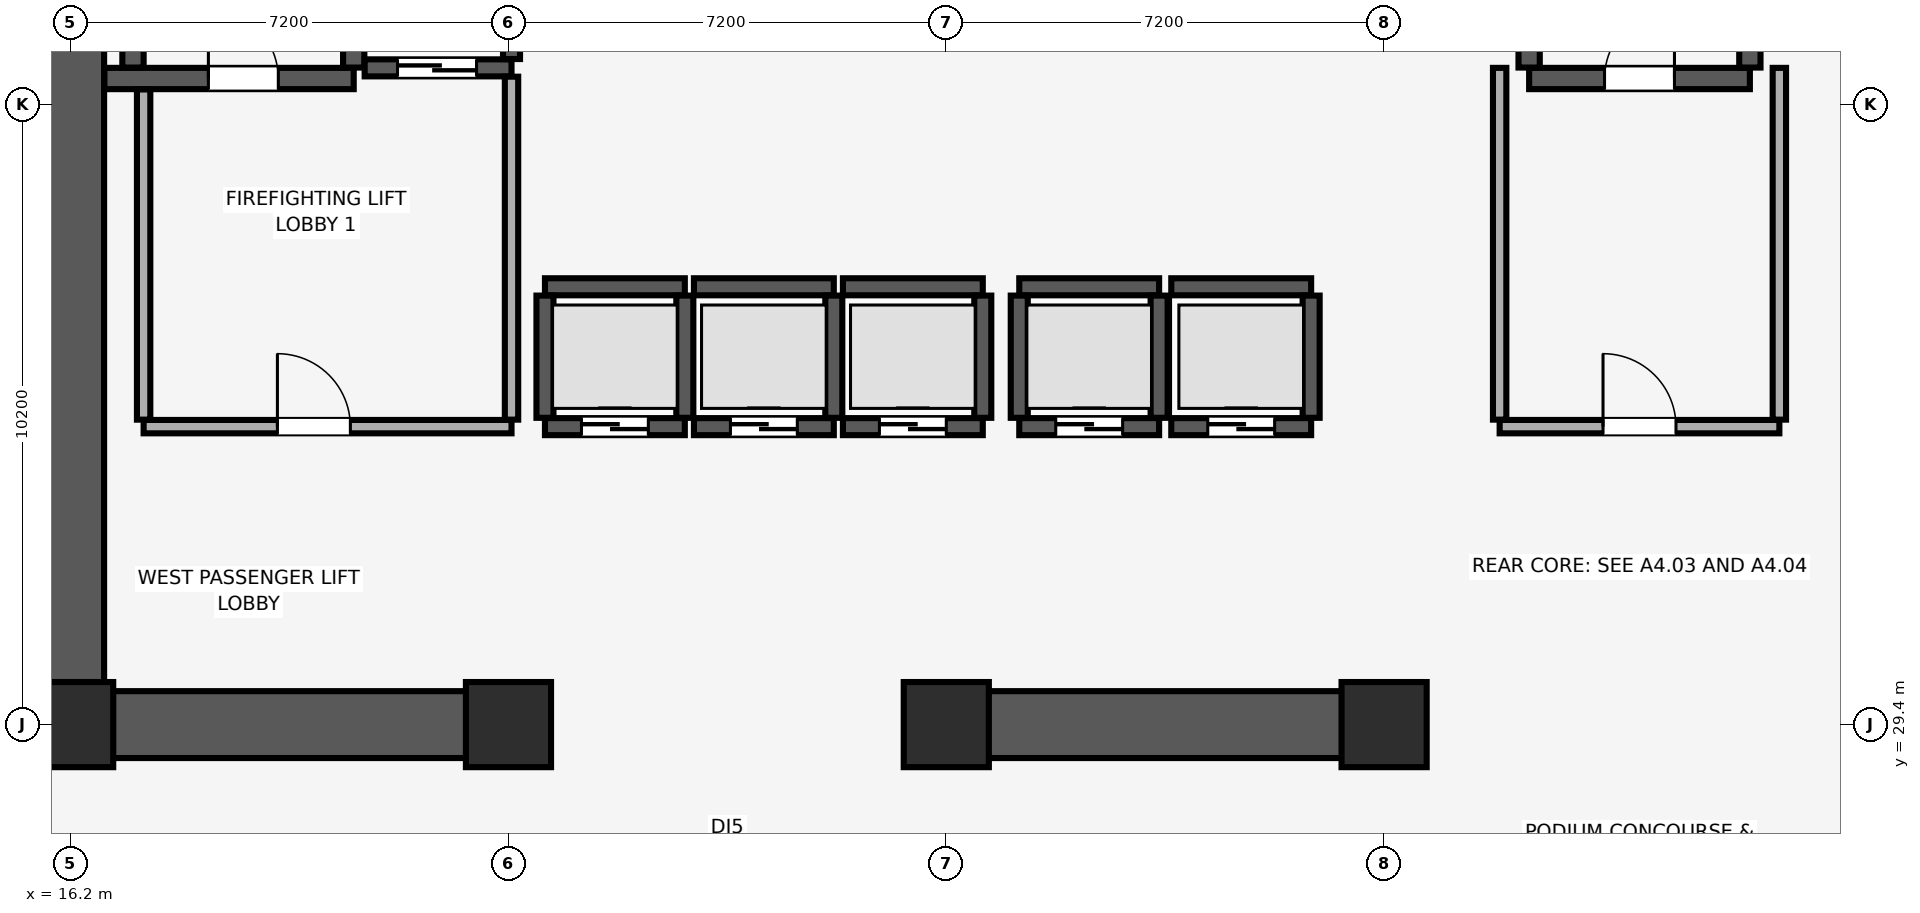
"""IFC4 building model, lengths in metres.
Left out: names, types, materials, properties, quantities, classifications, styles, units other than length and angle.
Written with IfcOpenShell. Run it as: python <this file> out.ifc"""

import sys

from ifc_helpers import new_model, si_unit, direction, frame, frame_2d, origin, origin_2d, place, context, subcontext, project, spatial, rectangle, extrude, element, fill, save


model = new_model("IFC4")
c1 = context("Model", 3, precision=1e-05, world=origin(), true_north=direction((0.0, 1.0)))
c2 = subcontext(c1, "Body", "Model", "MODEL_VIEW")
j1 = project(units=[si_unit("LENGTHUNIT", "METRE"), si_unit("PLANEANGLEUNIT", "RADIAN")], contexts=[c1])
p1 = place(None, origin())
s1 = spatial("IfcSite", under=j1, at=p1, CompositionType="ELEMENT")
p2 = place(p1, origin())
s2 = spatial("IfcBuilding", under=s1, at=p2, CompositionType="ELEMENT")
p3 = place(p2, frame((0.0, 0.0, 8.0)))
s3 = spatial("IfcBuildingStorey", under=s2, at=p3, CompositionType="ELEMENT", Elevation=8.0)
for number, where, z_axis, x_axis in (
    (1, (16.2, 29.4, 0.0), (0.0, 0.0, 1.0), (1.0, 0.0, 0.0)),
    (2, (23.4, 29.4, 0.0), (0.0, 0.0, 1.0), (1.0, 0.0, 0.0)),
    (3, (30.6, 29.4, 0.0), (0.0, 0.0, 1.0), (1.0, 0.0, 0.0)),
    (4, (37.8, 29.4, 0.0), (0.0, 0.0, 1.0), (1.0, 0.0, 0.0)),
):
    element("IfcColumn", number, at=place(p3, frame(where, z_axis=z_axis, x_axis=x_axis)), inside=s3, PredefinedType="COLUMN", context=c2, shape_type="SweptSolid", body=[
        extrude(rectangle(XDim=1.4, YDim=1.4, at=origin_2d()), origin(), (0.0, 0.0, 1.0), 5.68),
    ])
p4 = place(p3, frame((16.2, 29.4, 0.0), z_axis=(0.0, 0.0, 1.0), x_axis=(0.0, 1.0, 0.0)))
e5 = element("IfcWall", 5, at=p4, inside=s3, PredefinedType="SHEAR", context=c2, shape_type="SweptSolid", body=[
    extrude(rectangle(XDim=19.2, YDim=1.1, at=frame_2d((9.6, 0.0))), origin(), (0.0, 0.0, 1.0), 5.68),
])
p5 = place(p3, frame((16.755, 29.4, 0.0), z_axis=(0.0, 0.0, 1.0), x_axis=(1.0, 0.0, 0.0)))
e6 = element("IfcWall", 6, at=p5, inside=s3, PredefinedType="SHEAR", context=c2, shape_type="SweptSolid", body=[
    extrude(rectangle(XDim=6.845, YDim=1.1, at=frame_2d((3.423, 0.0))), origin(), (0.0, 0.0, 1.0), 5.68),
])
p6 = place(p3, frame((30.4, 29.4, 0.0), z_axis=(0.0, 0.0, 1.0), x_axis=(1.0, 0.0, 0.0)))
e7 = element("IfcWall", 7, at=p6, inside=s3, PredefinedType="SHEAR", context=c2, shape_type="SweptSolid", body=[
    extrude(rectangle(XDim=7.6, YDim=1.1, at=frame_2d((3.8, 0.0))), origin(), (0.0, 0.0, 1.0), 5.68),
])
p7 = place(p3, frame((16.755, 40.025, 0.0), z_axis=(0.0, 0.0, 1.0), x_axis=(1.0, 0.0, 0.0)))
e8 = element("IfcWall", 8, at=p7, inside=s3, PredefinedType="SHEAR", context=c2, shape_type="SweptSolid", body=[
    extrude(rectangle(XDim=4.1, YDim=0.35, at=frame_2d((2.05, 0.0))), origin(), (0.0, 0.0, 1.0), 5.68),
])
p8 = place(p7, frame((1.71, 0.0, 0.0)))
e9 = element("IfcOpeningElement", 9, at=p8, cuts=e8, PredefinedType="OPENING", context=c2, shape_type="SweptSolid", body=[
    extrude(rectangle(XDim=1.15, YDim=2.15, at=frame_2d((0.575, 1.075))), frame((0.0, 0.185, 0.0), z_axis=(0.0, -1.0, 0.0), x_axis=(1.0, 0.0, 0.0)), (0.0, 0.0, 1.0), 0.37),
])
for number, where, z_axis, x_axis in (
    (10, (17.225, 40.205, 0.0), (0.0, 0.0, 1.0), (0.0, 1.0, 0.0)),
    (11, (20.855, 40.205, 0.0), (0.0, 0.0, 1.0), (0.0, 1.0, 0.0)),
):
    element("IfcWall", number, at=place(p3, frame(where, z_axis=z_axis, x_axis=x_axis)), inside=s3, PredefinedType="SHEAR", context=c2, shape_type="SweptSolid", body=[
        extrude(rectangle(XDim=8.09, YDim=0.35, at=frame_2d((4.045, 0.0))), origin(), (0.0, 0.0, 1.0), 5.68),
    ])
p9 = place(p3, frame((40.185, 40.025, 0.0), z_axis=(0.0, 0.0, 1.0), x_axis=(1.0, 0.0, 0.0)))
e12 = element("IfcWall", 12, at=p9, inside=s3, PredefinedType="SHEAR", context=c2, shape_type="SweptSolid", body=[
    extrude(rectangle(XDim=3.63, YDim=0.35, at=frame_2d((1.815, 0.0))), origin(), (0.0, 0.0, 1.0), 5.68),
])
p10 = place(p9, frame((1.24, 0.0, 0.0)))
e13 = element("IfcOpeningElement", 13, at=p10, cuts=e12, PredefinedType="OPENING", context=c2, shape_type="SweptSolid", body=[
    extrude(rectangle(XDim=1.15, YDim=2.15, at=frame_2d((0.575, 1.075))), frame((0.0, 0.185, 0.0), z_axis=(0.0, -1.0, 0.0), x_axis=(1.0, 0.0, 0.0)), (0.0, 0.0, 1.0), 0.37),
])
for number, where, z_axis, x_axis in (
    (14, (40.185, 40.205, 0.0), (0.0, 0.0, 1.0), (0.0, 1.0, 0.0)),
    (15, (43.815, 40.205, 0.0), (0.0, 0.0, 1.0), (0.0, 1.0, 0.0)),
):
    element("IfcWall", number, at=place(p3, frame(where, z_axis=z_axis, x_axis=x_axis)), inside=s3, PredefinedType="SHEAR", context=c2, shape_type="SweptSolid", body=[
        extrude(rectangle(XDim=8.09, YDim=0.35, at=frame_2d((4.045, 0.0))), origin(), (0.0, 0.0, 1.0), 5.68),
    ])
p11 = place(p3, frame((24.0, 34.3, 0.0), z_axis=(0.0, 0.0, 1.0), x_axis=(1.0, 0.0, 0.0)))
e16 = element("IfcWall", 16, at=p11, inside=s3, PredefinedType="SHEAR", context=c2, shape_type="SweptSolid", body=[
    extrude(rectangle(XDim=2.3, YDim=0.28, at=frame_2d((1.15, 0.0))), origin(), (0.0, 0.0, 1.0), 5.68),
])
p12 = place(p11, frame((0.6, 0.0, 0.0)))
e17 = element("IfcOpeningElement", 17, at=p12, cuts=e16, PredefinedType="OPENING", context=c2, shape_type="SweptSolid", body=[
    extrude(rectangle(XDim=1.1, YDim=2.2, at=frame_2d((0.55, 1.1))), frame((0.0, 0.15, 0.0), z_axis=(0.0, -1.0, 0.0), x_axis=(1.0, 0.0, 0.0)), (0.0, 0.0, 1.0), 0.3),
])
p13 = place(p3, frame((24.0, 36.6, 0.0), z_axis=(0.0, 0.0, 1.0), x_axis=(1.0, 0.0, 0.0)))
e18 = element("IfcWall", 18, at=p13, inside=s3, PredefinedType="SHEAR", context=c2, shape_type="SweptSolid", body=[
    extrude(rectangle(XDim=2.3, YDim=0.28, at=frame_2d((1.15, 0.0))), origin(), (0.0, 0.0, 1.0), 5.68),
])
for number, where, z_axis, x_axis in (
    (19, (24.0, 34.445, 0.0), (0.0, 0.0, 1.0), (0.0, 1.0, 0.0)),
    (20, (26.3, 34.445, 0.0), (0.0, 0.0, 1.0), (0.0, 1.0, 0.0)),
):
    element("IfcWall", number, at=place(p3, frame(where, z_axis=z_axis, x_axis=x_axis)), inside=s3, PredefinedType="SHEAR", context=c2, shape_type="SweptSolid", body=[
        extrude(rectangle(XDim=2.01, YDim=0.28, at=frame_2d((1.005, 0.0))), origin(), (0.0, 0.0, 1.0), 5.68),
    ])
p14 = place(p3, frame((26.45, 34.3, 0.0), z_axis=(0.0, 0.0, 1.0), x_axis=(1.0, 0.0, 0.0)))
e21 = element("IfcWall", 21, at=p14, inside=s3, PredefinedType="SHEAR", context=c2, shape_type="SweptSolid", body=[
    extrude(rectangle(XDim=2.3, YDim=0.28, at=frame_2d((1.15, 0.0))), origin(), (0.0, 0.0, 1.0), 5.68),
])
p15 = place(p14, frame((0.6, 0.0, 0.0)))
e22 = element("IfcOpeningElement", 22, at=p15, cuts=e21, PredefinedType="OPENING", context=c2, shape_type="SweptSolid", body=[
    extrude(rectangle(XDim=1.1, YDim=2.2, at=frame_2d((0.55, 1.1))), frame((0.0, 0.15, 0.0), z_axis=(0.0, -1.0, 0.0), x_axis=(1.0, 0.0, 0.0)), (0.0, 0.0, 1.0), 0.3),
])
p16 = place(p3, frame((26.45, 36.6, 0.0), z_axis=(0.0, 0.0, 1.0), x_axis=(1.0, 0.0, 0.0)))
e23 = element("IfcWall", 23, at=p16, inside=s3, PredefinedType="SHEAR", context=c2, shape_type="SweptSolid", body=[
    extrude(rectangle(XDim=2.3, YDim=0.28, at=frame_2d((1.15, 0.0))), origin(), (0.0, 0.0, 1.0), 5.68),
])
p17 = place(p3, frame((28.75, 34.445, 0.0), z_axis=(0.0, 0.0, 1.0), x_axis=(0.0, 1.0, 0.0)))
e24 = element("IfcWall", 24, at=p17, inside=s3, PredefinedType="SHEAR", context=c2, shape_type="SweptSolid", body=[
    extrude(rectangle(XDim=2.01, YDim=0.28, at=frame_2d((1.005, 0.0))), origin(), (0.0, 0.0, 1.0), 5.68),
])
p18 = place(p3, frame((28.9, 34.3, 0.0), z_axis=(0.0, 0.0, 1.0), x_axis=(1.0, 0.0, 0.0)))
e25 = element("IfcWall", 25, at=p18, inside=s3, PredefinedType="SHEAR", context=c2, shape_type="SweptSolid", body=[
    extrude(rectangle(XDim=2.3, YDim=0.28, at=frame_2d((1.15, 0.0))), origin(), (0.0, 0.0, 1.0), 5.68),
])
p19 = place(p18, frame((0.6, 0.0, 0.0)))
e26 = element("IfcOpeningElement", 26, at=p19, cuts=e25, PredefinedType="OPENING", context=c2, shape_type="SweptSolid", body=[
    extrude(rectangle(XDim=1.1, YDim=2.2, at=frame_2d((0.55, 1.1))), frame((0.0, 0.15, 0.0), z_axis=(0.0, -1.0, 0.0), x_axis=(1.0, 0.0, 0.0)), (0.0, 0.0, 1.0), 0.3),
])
p20 = place(p3, frame((28.9, 36.6, 0.0), z_axis=(0.0, 0.0, 1.0), x_axis=(1.0, 0.0, 0.0)))
e27 = element("IfcWall", 27, at=p20, inside=s3, PredefinedType="SHEAR", context=c2, shape_type="SweptSolid", body=[
    extrude(rectangle(XDim=2.3, YDim=0.28, at=frame_2d((1.15, 0.0))), origin(), (0.0, 0.0, 1.0), 5.68),
])
p21 = place(p3, frame((31.2, 34.445, 0.0), z_axis=(0.0, 0.0, 1.0), x_axis=(0.0, 1.0, 0.0)))
e28 = element("IfcWall", 28, at=p21, inside=s3, PredefinedType="SHEAR", context=c2, shape_type="SweptSolid", body=[
    extrude(rectangle(XDim=2.01, YDim=0.28, at=frame_2d((1.005, 0.0))), origin(), (0.0, 0.0, 1.0), 5.68),
])
p22 = place(p3, frame((31.8, 34.3, 0.0), z_axis=(0.0, 0.0, 1.0), x_axis=(1.0, 0.0, 0.0)))
e29 = element("IfcWall", 29, at=p22, inside=s3, PredefinedType="SHEAR", context=c2, shape_type="SweptSolid", body=[
    extrude(rectangle(XDim=2.3, YDim=0.28, at=frame_2d((1.15, 0.0))), origin(), (0.0, 0.0, 1.0), 5.68),
])
p23 = place(p22, frame((0.6, 0.0, 0.0)))
e30 = element("IfcOpeningElement", 30, at=p23, cuts=e29, PredefinedType="OPENING", context=c2, shape_type="SweptSolid", body=[
    extrude(rectangle(XDim=1.1, YDim=2.2, at=frame_2d((0.55, 1.1))), frame((0.0, 0.15, 0.0), z_axis=(0.0, -1.0, 0.0), x_axis=(1.0, 0.0, 0.0)), (0.0, 0.0, 1.0), 0.3),
])
p24 = place(p3, frame((31.8, 36.6, 0.0), z_axis=(0.0, 0.0, 1.0), x_axis=(1.0, 0.0, 0.0)))
e31 = element("IfcWall", 31, at=p24, inside=s3, PredefinedType="SHEAR", context=c2, shape_type="SweptSolid", body=[
    extrude(rectangle(XDim=2.3, YDim=0.28, at=frame_2d((1.15, 0.0))), origin(), (0.0, 0.0, 1.0), 5.68),
])
for number, where, z_axis, x_axis in (
    (32, (31.8, 34.445, 0.0), (0.0, 0.0, 1.0), (0.0, 1.0, 0.0)),
    (33, (34.1, 34.445, 0.0), (0.0, 0.0, 1.0), (0.0, 1.0, 0.0)),
):
    element("IfcWall", number, at=place(p3, frame(where, z_axis=z_axis, x_axis=x_axis)), inside=s3, PredefinedType="SHEAR", context=c2, shape_type="SweptSolid", body=[
        extrude(rectangle(XDim=2.01, YDim=0.28, at=frame_2d((1.005, 0.0))), origin(), (0.0, 0.0, 1.0), 5.68),
    ])
p25 = place(p3, frame((34.3, 34.3, 0.0), z_axis=(0.0, 0.0, 1.0), x_axis=(1.0, 0.0, 0.0)))
e34 = element("IfcWall", 34, at=p25, inside=s3, PredefinedType="SHEAR", context=c2, shape_type="SweptSolid", body=[
    extrude(rectangle(XDim=2.3, YDim=0.28, at=frame_2d((1.15, 0.0))), origin(), (0.0, 0.0, 1.0), 5.68),
])
p26 = place(p25, frame((0.6, 0.0, 0.0)))
e35 = element("IfcOpeningElement", 35, at=p26, cuts=e34, PredefinedType="OPENING", context=c2, shape_type="SweptSolid", body=[
    extrude(rectangle(XDim=1.1, YDim=2.2, at=frame_2d((0.55, 1.1))), frame((0.0, 0.15, 0.0), z_axis=(0.0, -1.0, 0.0), x_axis=(1.0, 0.0, 0.0)), (0.0, 0.0, 1.0), 0.3),
])
p27 = place(p3, frame((34.3, 36.6, 0.0), z_axis=(0.0, 0.0, 1.0), x_axis=(1.0, 0.0, 0.0)))
e36 = element("IfcWall", 36, at=p27, inside=s3, PredefinedType="SHEAR", context=c2, shape_type="SweptSolid", body=[
    extrude(rectangle(XDim=2.3, YDim=0.28, at=frame_2d((1.15, 0.0))), origin(), (0.0, 0.0, 1.0), 5.68),
])
p28 = place(p3, frame((36.6, 34.445, 0.0), z_axis=(0.0, 0.0, 1.0), x_axis=(0.0, 1.0, 0.0)))
e37 = element("IfcWall", 37, at=p28, inside=s3, PredefinedType="SHEAR", context=c2, shape_type="SweptSolid", body=[
    extrude(rectangle(XDim=2.01, YDim=0.28, at=frame_2d((1.005, 0.0))), origin(), (0.0, 0.0, 1.0), 5.68),
])
p29 = place(p3, frame((21.035, 40.2, 0.0), z_axis=(0.0, 0.0, 1.0), x_axis=(1.0, 0.0, 0.0)))
e38 = element("IfcWall", 38, at=p29, inside=s3, PredefinedType="SHEAR", context=c2, shape_type="SweptSolid", body=[
    extrude(rectangle(XDim=2.415, YDim=0.28, at=frame_2d((1.208, 0.0))), origin(), (0.0, 0.0, 1.0), 5.68),
])
p30 = place(p29, frame((0.54, 0.0, 0.0)))
e39 = element("IfcOpeningElement", 39, at=p30, cuts=e38, PredefinedType="OPENING", context=c2, shape_type="SweptSolid", body=[
    extrude(rectangle(XDim=1.3, YDim=2.3, at=frame_2d((0.65, 1.15))), frame((0.0, 0.15, 0.0), z_axis=(0.0, -1.0, 0.0), x_axis=(1.0, 0.0, 0.0)), (0.0, 0.0, 1.0), 0.3),
])
p31 = place(p3, frame((23.45, 40.345, 0.0), z_axis=(0.0, 0.0, 1.0), x_axis=(0.0, 1.0, 0.0)))
e40 = element("IfcWall", 40, at=p31, inside=s3, PredefinedType="SHEAR", context=c2, shape_type="SweptSolid", body=[
    extrude(rectangle(XDim=2.81, YDim=0.28, at=frame_2d((1.405, 0.0))), origin(), (0.0, 0.0, 1.0), 5.68),
])
p32 = place(p3, frame((17.4, 34.3, 0.0), z_axis=(0.0, 0.0, 1.0), x_axis=(1.0, 0.0, 0.0)))
e41 = element("IfcWall", 41, at=p32, inside=s3, PredefinedType="PARTITIONING", context=c2, shape_type="SweptSolid", body=[
    extrude(rectangle(XDim=6.05, YDim=0.22, at=frame_2d((3.025, 0.0))), origin(), (0.0, 0.0, 1.0), 5.68),
])
p33 = place(p32, frame((2.2, 0.0, 0.0)))
e42 = element("IfcOpeningElement", 42, at=p33, cuts=e41, PredefinedType="OPENING", context=c2, shape_type="SweptSolid", body=[
    extrude(rectangle(XDim=1.2, YDim=2.15, at=frame_2d((0.6, 1.075))), frame((0.0, 0.12, 0.0), z_axis=(0.0, -1.0, 0.0), x_axis=(1.0, 0.0, 0.0)), (0.0, 0.0, 1.0), 0.24),
])
p34 = place(p3, frame((17.4, 34.415, 0.0), z_axis=(0.0, 0.0, 1.0), x_axis=(0.0, 1.0, 0.0)))
e43 = element("IfcWall", 43, at=p34, inside=s3, PredefinedType="PARTITIONING", context=c2, shape_type="SweptSolid", body=[
    extrude(rectangle(XDim=5.43, YDim=0.22, at=frame_2d((2.715, 0.0))), origin(), (0.0, 0.0, 1.0), 5.68),
])
p35 = place(p3, frame((23.45, 34.415, 0.0), z_axis=(0.0, 0.0, 1.0), x_axis=(0.0, 1.0, 0.0)))
e44 = element("IfcWall", 44, at=p35, inside=s3, PredefinedType="PARTITIONING", context=c2, shape_type="SweptSolid", body=[
    extrude(rectangle(XDim=5.64, YDim=0.22, at=frame_2d((2.82, 0.0))), origin(), (0.0, 0.0, 1.0), 5.68),
])
p36 = place(p3, frame((39.7, 34.3, 0.0), z_axis=(0.0, 0.0, 1.0), x_axis=(1.0, 0.0, 0.0)))
e45 = element("IfcWall", 45, at=p36, inside=s3, PredefinedType="PARTITIONING", context=c2, shape_type="SweptSolid", body=[
    extrude(rectangle(XDim=4.6, YDim=0.22, at=frame_2d((2.3, 0.0))), origin(), (0.0, 0.0, 1.0), 5.68),
])
p37 = place(p36, frame((1.7, 0.0, 0.0)))
e46 = element("IfcOpeningElement", 46, at=p37, cuts=e45, PredefinedType="OPENING", context=c2, shape_type="SweptSolid", body=[
    extrude(rectangle(XDim=1.2, YDim=2.15, at=frame_2d((0.6, 1.075))), frame((0.0, 0.12, 0.0), z_axis=(0.0, -1.0, 0.0), x_axis=(1.0, 0.0, 0.0)), (0.0, 0.0, 1.0), 0.24),
])
for number, where, z_axis, x_axis in (
    (47, (39.7, 34.415, 0.0), (0.0, 0.0, 1.0), (0.0, 1.0, 0.0)),
    (48, (44.3, 34.415, 0.0), (0.0, 0.0, 1.0), (0.0, 1.0, 0.0)),
):
    element("IfcWall", number, at=place(p3, frame(where, z_axis=z_axis, x_axis=x_axis)), inside=s3, PredefinedType="PARTITIONING", context=c2, shape_type="SweptSolid", body=[
        extrude(rectangle(XDim=5.785, YDim=0.22, at=frame_2d((2.893, 0.0))), origin(), (0.0, 0.0, 1.0), 5.68),
    ])
p38 = place(p8, origin())
e49 = element("IfcDoor", 49, at=p38, inside=s3, OperationType="SINGLE_SWING_LEFT", PredefinedType="DOOR", context=c2, shape_type="SweptSolid", body=[
    extrude(rectangle(XDim=1.15, YDim=2.15, at=frame_2d((0.575, 1.075))), frame((0.0, 0.025, 0.0), z_axis=(0.0, -1.0, 0.0), x_axis=(1.0, 0.0, 0.0)), (0.0, 0.0, 1.0), 0.05),
])
fill(e9, e49)
p39 = place(p10, origin())
e50 = element("IfcDoor", 50, at=p39, inside=s3, OperationType="SINGLE_SWING_RIGHT", PredefinedType="DOOR", context=c2, shape_type="SweptSolid", body=[
    extrude(rectangle(XDim=1.15, YDim=2.15, at=frame_2d((0.575, 1.075))), frame((0.0, 0.025, 0.0), z_axis=(0.0, -1.0, 0.0), x_axis=(1.0, 0.0, 0.0)), (0.0, 0.0, 1.0), 0.05),
])
fill(e13, e50)
p40 = place(p12, origin())
e51 = element("IfcDoor", 51, at=p40, inside=s3, OperationType="DOUBLE_DOOR_SLIDING", PredefinedType="DOOR", context=c2, shape_type="SweptSolid", body=[
    extrude(rectangle(XDim=1.1, YDim=2.2, at=frame_2d((0.55, 1.1))), frame((0.0, 0.025, 0.0), z_axis=(0.0, -1.0, 0.0), x_axis=(1.0, 0.0, 0.0)), (0.0, 0.0, 1.0), 0.05),
])
fill(e17, e51)
p41 = place(p15, origin())
e52 = element("IfcDoor", 52, at=p41, inside=s3, OperationType="DOUBLE_DOOR_SLIDING", PredefinedType="DOOR", context=c2, shape_type="SweptSolid", body=[
    extrude(rectangle(XDim=1.1, YDim=2.2, at=frame_2d((0.55, 1.1))), frame((0.0, 0.025, 0.0), z_axis=(0.0, -1.0, 0.0), x_axis=(1.0, 0.0, 0.0)), (0.0, 0.0, 1.0), 0.05),
])
fill(e22, e52)
p42 = place(p19, origin())
e53 = element("IfcDoor", 53, at=p42, inside=s3, OperationType="DOUBLE_DOOR_SLIDING", PredefinedType="DOOR", context=c2, shape_type="SweptSolid", body=[
    extrude(rectangle(XDim=1.1, YDim=2.2, at=frame_2d((0.55, 1.1))), frame((0.0, 0.025, 0.0), z_axis=(0.0, -1.0, 0.0), x_axis=(1.0, 0.0, 0.0)), (0.0, 0.0, 1.0), 0.05),
])
fill(e26, e53)
p43 = place(p23, origin())
e54 = element("IfcDoor", 54, at=p43, inside=s3, OperationType="DOUBLE_DOOR_SLIDING", PredefinedType="DOOR", context=c2, shape_type="SweptSolid", body=[
    extrude(rectangle(XDim=1.1, YDim=2.2, at=frame_2d((0.55, 1.1))), frame((0.0, 0.025, 0.0), z_axis=(0.0, -1.0, 0.0), x_axis=(1.0, 0.0, 0.0)), (0.0, 0.0, 1.0), 0.05),
])
fill(e30, e54)
p44 = place(p26, origin())
e55 = element("IfcDoor", 55, at=p44, inside=s3, OperationType="DOUBLE_DOOR_SLIDING", PredefinedType="DOOR", context=c2, shape_type="SweptSolid", body=[
    extrude(rectangle(XDim=1.1, YDim=2.2, at=frame_2d((0.55, 1.1))), frame((0.0, 0.025, 0.0), z_axis=(0.0, -1.0, 0.0), x_axis=(1.0, 0.0, 0.0)), (0.0, 0.0, 1.0), 0.05),
])
fill(e35, e55)
p45 = place(p30, origin())
e56 = element("IfcDoor", 56, at=p45, inside=s3, OperationType="DOUBLE_DOOR_SLIDING", PredefinedType="DOOR", context=c2, shape_type="SweptSolid", body=[
    extrude(rectangle(XDim=1.3, YDim=2.3, at=frame_2d((0.65, 1.15))), frame((0.0, 0.025, 0.0), z_axis=(0.0, -1.0, 0.0), x_axis=(1.0, 0.0, 0.0)), (0.0, 0.0, 1.0), 0.05),
])
fill(e39, e56)
p46 = place(p33, origin())
e57 = element("IfcDoor", 57, at=p46, inside=s3, OperationType="SINGLE_SWING_LEFT", PredefinedType="DOOR", context=c2, shape_type="SweptSolid", body=[
    extrude(rectangle(XDim=1.2, YDim=2.15, at=frame_2d((0.6, 1.075))), frame((0.0, 0.025, 0.0), z_axis=(0.0, -1.0, 0.0), x_axis=(1.0, 0.0, 0.0)), (0.0, 0.0, 1.0), 0.05),
])
fill(e42, e57)
p47 = place(p37, origin())
e58 = element("IfcDoor", 58, at=p47, inside=s3, OperationType="SINGLE_SWING_LEFT", PredefinedType="DOOR", context=c2, shape_type="SweptSolid", body=[
    extrude(rectangle(XDim=1.2, YDim=2.15, at=frame_2d((0.6, 1.075))), frame((0.0, 0.025, 0.0), z_axis=(0.0, -1.0, 0.0), x_axis=(1.0, 0.0, 0.0)), (0.0, 0.0, 1.0), 0.05),
])
fill(e46, e58)
save(model, sys.argv[1])
